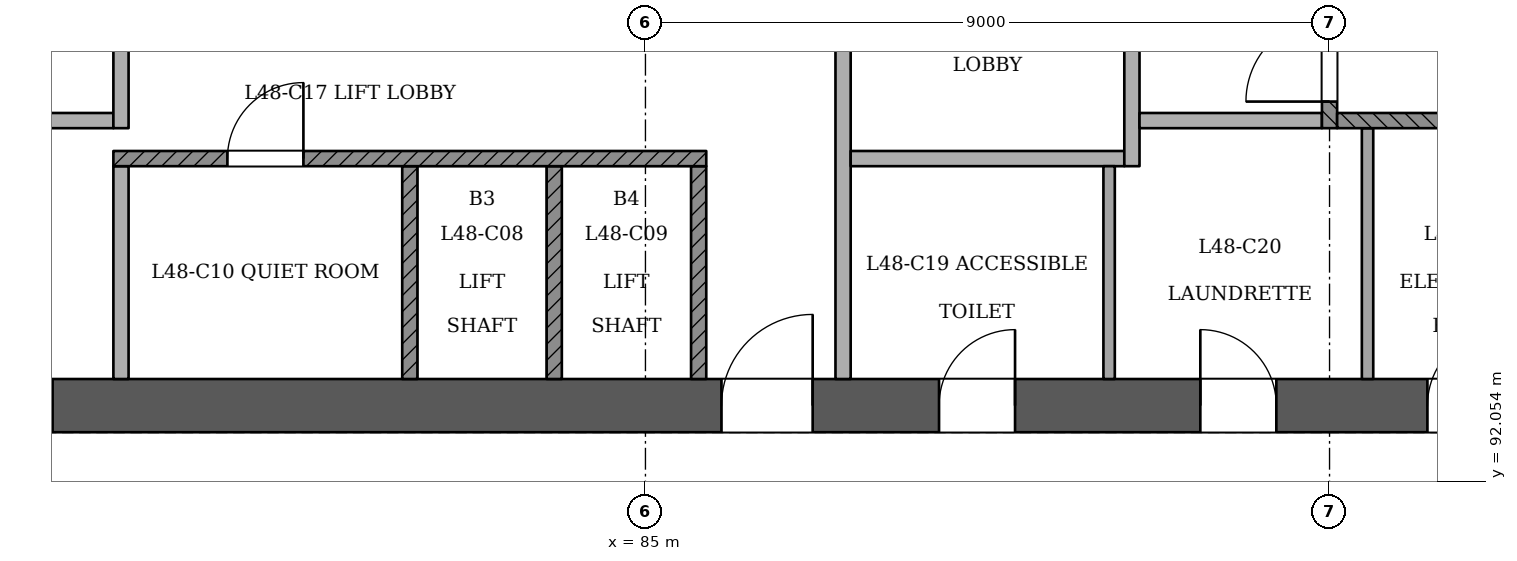
"""IFC4 building model, lengths in metres.
Left out: names, types, materials, properties, quantities, classifications, styles, units other than length and angle.
Written with IfcOpenShell. Run it as: python <this file> out.ifc"""

import sys

from ifc_helpers import new_model, si_unit, direction, frame, frame_2d, origin, place, context, subcontext, project, spatial, rectangle, extrude, element, fill, save


model = new_model("IFC4")
c1 = context("Model", 3, precision=1e-05, world=origin(), true_north=direction((0.0, 1.0)))
c2 = subcontext(c1, "Body", "Model", "MODEL_VIEW")
j1 = project(units=[si_unit("LENGTHUNIT", "METRE"), si_unit("PLANEANGLEUNIT", "RADIAN")], contexts=[c1])
p1 = place(None, origin())
s1 = spatial("IfcSite", under=j1, at=p1, CompositionType="ELEMENT")
p2 = place(p1, origin())
s2 = spatial("IfcBuilding", under=s1, at=p2, CompositionType="ELEMENT")
p3 = place(p2, frame((0.0, 0.0, 185.4)))
s3 = spatial("IfcBuildingStorey", under=s2, at=p3, CompositionType="ELEMENT", Elevation=185.4)
p4 = place(p3, frame((72.65, 93.05, 0.0), z_axis=(0.0, 0.0, 1.0), x_axis=(1.0, 0.0, 0.0)))
e1 = element("IfcWall", 1, at=p4, inside=s3, PredefinedType="SHEAR", context=c2, shape_type="SweptSolid", body=[
    extrude(rectangle(XDim=25.05, YDim=0.7, at=frame_2d((12.525, 0.0))), origin(), (0.0, 0.0, 1.0), 3.6),
])
p5 = place(p4, frame((1.15, 0.0, 0.0)))
e2 = element("IfcOpeningElement", 2, at=p5, cuts=e1, PredefinedType="OPENING", context=c2, shape_type="SweptSolid", body=[
    extrude(rectangle(XDim=1.2, YDim=2.1, at=frame_2d((0.6, 1.05))), frame((0.0, 0.36, 0.0), z_axis=(0.0, -1.0, 0.0), x_axis=(1.0, 0.0, 0.0)), (0.0, 0.0, 1.0), 0.721),
])
p6 = place(p4, frame((3.35, 0.0, 0.0)))
e3 = element("IfcOpeningElement", 3, at=p6, cuts=e1, PredefinedType="OPENING", context=c2, shape_type="SweptSolid", body=[
    extrude(rectangle(XDim=1.2, YDim=2.1, at=frame_2d((0.6, 1.05))), frame((0.0, 0.36, 0.0), z_axis=(0.0, -1.0, 0.0), x_axis=(1.0, 0.0, 0.0)), (0.0, 0.0, 1.0), 0.721),
])
p7 = place(p4, frame((13.35, 0.0, 0.0)))
e4 = element("IfcOpeningElement", 4, at=p7, cuts=e1, PredefinedType="OPENING", context=c2, shape_type="SweptSolid", body=[
    extrude(rectangle(XDim=1.2, YDim=2.1, at=frame_2d((0.6, 1.05))), frame((0.0, 0.36, 0.0), z_axis=(0.0, -1.0, 0.0), x_axis=(1.0, 0.0, 0.0)), (0.0, 0.0, 1.0), 0.721),
])
p8 = place(p4, frame((16.212, 0.0, 0.0)))
e5 = element("IfcOpeningElement", 5, at=p8, cuts=e1, PredefinedType="OPENING", context=c2, shape_type="SweptSolid", body=[
    extrude(rectangle(XDim=1.0, YDim=2.1, at=frame_2d((0.5, 1.05))), frame((0.0, 0.36, 0.0), z_axis=(0.0, -1.0, 0.0), x_axis=(1.0, 0.0, 0.0)), (0.0, 0.0, 1.0), 0.721),
])
p9 = place(p4, frame((19.65, 0.0, 0.0)))
e6 = element("IfcOpeningElement", 6, at=p9, cuts=e1, PredefinedType="OPENING", context=c2, shape_type="SweptSolid", body=[
    extrude(rectangle(XDim=1.0, YDim=2.1, at=frame_2d((0.5, 1.05))), frame((0.0, 0.36, 0.0), z_axis=(0.0, -1.0, 0.0), x_axis=(1.0, 0.0, 0.0)), (0.0, 0.0, 1.0), 0.721),
])
p10 = place(p4, frame((22.637, 0.0, 0.0)))
e7 = element("IfcOpeningElement", 7, at=p10, cuts=e1, PredefinedType="OPENING", context=c2, shape_type="SweptSolid", body=[
    extrude(rectangle(XDim=1.0, YDim=2.1, at=frame_2d((0.5, 1.05))), frame((0.0, 0.36, 0.0), z_axis=(0.0, -1.0, 0.0), x_axis=(1.0, 0.0, 0.0)), (0.0, 0.0, 1.0), 0.721),
])
p11 = place(p3, frame((78.1, 93.4, 0.0), z_axis=(0.0, 0.0, 1.0), x_axis=(0.0, 1.0, 0.0)))
e8 = element("IfcWall", 8, at=p11, inside=s3, PredefinedType="PARTITIONING", context=c2, shape_type="SweptSolid", body=[
    extrude(rectangle(XDim=2.8, YDim=0.2, at=frame_2d((1.4, 0.0))), origin(), (0.0, 0.0, 1.0), 3.3),
])
for number, where, z_axis, x_axis in (
    (9, (81.9, 93.4, 0.0), (0.0, 0.0, 1.0), (0.0, 1.0, 0.0)),
    (10, (83.8, 93.4, 0.0), (0.0, 0.0, 1.0), (0.0, 1.0, 0.0)),
    (11, (85.7, 93.4, 0.0), (0.0, 0.0, 1.0), (0.0, 1.0, 0.0)),
):
    element("IfcWall", number, at=place(p3, frame(where, z_axis=z_axis, x_axis=x_axis)), inside=s3, PredefinedType="SOLIDWALL", context=c2, shape_type="SweptSolid", body=[
        extrude(rectangle(XDim=2.8, YDim=0.2, at=frame_2d((1.4, 0.0))), origin(), (0.0, 0.0, 1.0), 3.3),
    ])
p12 = place(p3, frame((87.6, 93.4, 0.0), z_axis=(0.0, 0.0, 1.0), x_axis=(0.0, 1.0, 0.0)))
e12 = element("IfcWall", 12, at=p12, inside=s3, PredefinedType="PARTITIONING", context=c2, shape_type="SweptSolid", body=[
    extrude(rectangle(XDim=7.0, YDim=0.2, at=frame_2d((3.5, 0.0))), origin(), (0.0, 0.0, 1.0), 3.3),
])
p13 = place(p12, frame((4.45, 0.0, 0.0)))
e13 = element("IfcOpeningElement", 13, at=p13, cuts=e12, PredefinedType="OPENING", context=c2, shape_type="SweptSolid", body=[
    extrude(rectangle(XDim=1.1, YDim=2.1, at=frame_2d((0.55, 1.05))), frame((0.0, 0.11, 0.0), z_axis=(0.0, -1.0, 0.0), x_axis=(1.0, 0.0, 0.0)), (0.0, 0.0, 1.0), 0.221),
])
p14 = place(p3, frame((91.1, 93.4, 0.0), z_axis=(0.0, 0.0, 1.0), x_axis=(0.0, 1.0, 0.0)))
e14 = element("IfcWall", 14, at=p14, inside=s3, PredefinedType="PARTITIONING", context=c2, shape_type="SweptSolid", body=[
    extrude(rectangle(XDim=2.8, YDim=0.15, at=frame_2d((1.4, 0.0))), origin(), (0.0, 0.0, 1.0), 3.3),
])
p15 = place(p3, frame((94.5, 93.4, 0.0), z_axis=(0.0, 0.0, 1.0), x_axis=(0.0, 1.0, 0.0)))
e15 = element("IfcWall", 15, at=p15, inside=s3, PredefinedType="PARTITIONING", context=c2, shape_type="SweptSolid", body=[
    extrude(rectangle(XDim=3.3, YDim=0.15, at=frame_2d((1.65, 0.0))), origin(), (0.0, 0.0, 1.0), 3.3),
])
p16 = place(p3, frame((78.0, 96.3, 0.0), z_axis=(0.0, 0.0, 1.0), x_axis=(1.0, 0.0, 0.0)))
e16 = element("IfcWall", 16, at=p16, inside=s3, PredefinedType="SOLIDWALL", context=c2, shape_type="SweptSolid", body=[
    extrude(rectangle(XDim=7.8, YDim=0.2, at=frame_2d((3.9, 0.0))), origin(), (0.0, 0.0, 1.0), 3.3),
])
p17 = place(p16, frame((1.5, 0.0, 0.0)))
e17 = element("IfcOpeningElement", 17, at=p17, cuts=e16, PredefinedType="OPENING", context=c2, shape_type="SweptSolid", body=[
    extrude(rectangle(XDim=1.0, YDim=2.1, at=frame_2d((0.5, 1.05))), frame((0.0, 0.11, 0.0), z_axis=(0.0, -1.0, 0.0), x_axis=(1.0, 0.0, 0.0)), (0.0, 0.0, 1.0), 0.221),
])
p18 = place(p3, frame((87.7, 96.3, 0.0), z_axis=(0.0, 0.0, 1.0), x_axis=(1.0, 0.0, 0.0)))
e18 = element("IfcWall", 18, at=p18, inside=s3, PredefinedType="PARTITIONING", context=c2, shape_type="SweptSolid", body=[
    extrude(rectangle(XDim=3.6, YDim=0.2, at=frame_2d((1.8, 0.0))), origin(), (0.0, 0.0, 1.0), 3.3),
])
p19 = place(p3, frame((91.4, 96.2, 0.0), z_axis=(0.0, 0.0, 1.0), x_axis=(0.0, 1.0, 0.0)))
e19 = element("IfcWall", 19, at=p19, inside=s3, PredefinedType="PARTITIONING", context=c2, shape_type="SweptSolid", body=[
    extrude(rectangle(XDim=4.2, YDim=0.2, at=frame_2d((2.1, 0.0))), origin(), (0.0, 0.0, 1.0), 3.3),
])
p20 = place(p19, frame((2.45, 0.0, 0.0)))
e20 = element("IfcOpeningElement", 20, at=p20, cuts=e19, PredefinedType="OPENING", context=c2, shape_type="SweptSolid", body=[
    extrude(rectangle(XDim=1.1, YDim=2.1, at=frame_2d((0.55, 1.05))), frame((0.0, 0.11, 0.0), z_axis=(0.0, -1.0, 0.0), x_axis=(1.0, 0.0, 0.0)), (0.0, 0.0, 1.0), 0.221),
])
p21 = place(p3, frame((76.1, 96.8, 0.0), z_axis=(0.0, 0.0, 1.0), x_axis=(1.0, 0.0, 0.0)))
e21 = element("IfcWall", 21, at=p21, inside=s3, PredefinedType="PARTITIONING", context=c2, shape_type="SweptSolid", body=[
    extrude(rectangle(XDim=1.9, YDim=0.2, at=frame_2d((0.95, 0.0))), origin(), (0.0, 0.0, 1.0), 3.3),
])
p22 = place(p3, frame((78.1, 96.7, 0.0), z_axis=(0.0, 0.0, 1.0), x_axis=(0.0, 1.0, 0.0)))
e22 = element("IfcWall", 22, at=p22, inside=s3, PredefinedType="PARTITIONING", context=c2, shape_type="SweptSolid", body=[
    extrude(rectangle(XDim=3.7, YDim=0.2, at=frame_2d((1.85, 0.0))), origin(), (0.0, 0.0, 1.0), 3.3),
])
p23 = place(p22, frame((1.95, 0.0, 0.0)))
e23 = element("IfcOpeningElement", 23, at=p23, cuts=e22, PredefinedType="OPENING", context=c2, shape_type="SweptSolid", body=[
    extrude(rectangle(XDim=1.1, YDim=2.1, at=frame_2d((0.55, 1.05))), frame((0.0, 0.11, 0.0), z_axis=(0.0, -1.0, 0.0), x_axis=(1.0, 0.0, 0.0)), (0.0, 0.0, 1.0), 0.221),
])
p24 = place(p3, frame((91.5, 96.8, 0.0), z_axis=(0.0, 0.0, 1.0), x_axis=(1.0, 0.0, 0.0)))
e24 = element("IfcWall", 24, at=p24, inside=s3, PredefinedType="PARTITIONING", context=c2, shape_type="SweptSolid", body=[
    extrude(rectangle(XDim=2.4, YDim=0.2, at=frame_2d((1.2, 0.0))), origin(), (0.0, 0.0, 1.0), 3.3),
])
p25 = place(p3, frame((94.0, 96.7, 0.0), z_axis=(0.0, 0.0, 1.0), x_axis=(0.0, 1.0, 0.0)))
e25 = element("IfcWall", 25, at=p25, inside=s3, PredefinedType="SOLIDWALL", context=c2, shape_type="SweptSolid", body=[
    extrude(rectangle(XDim=3.7, YDim=0.2, at=frame_2d((1.85, 0.0))), origin(), (0.0, 0.0, 1.0), 3.3),
])
p26 = place(p25, frame((0.35, 0.0, 0.0)))
e26 = element("IfcOpeningElement", 26, at=p26, cuts=e25, PredefinedType="OPENING", context=c2, shape_type="SweptSolid", body=[
    extrude(rectangle(XDim=1.1, YDim=2.1, at=frame_2d((0.55, 1.05))), frame((0.0, 0.11, 0.0), z_axis=(0.0, -1.0, 0.0), x_axis=(1.0, 0.0, 0.0)), (0.0, 0.0, 1.0), 0.221),
])
p27 = place(p3, frame((94.1, 96.8, 0.0), z_axis=(0.0, 0.0, 1.0), x_axis=(1.0, 0.0, 0.0)))
e27 = element("IfcWall", 27, at=p27, inside=s3, PredefinedType="SOLIDWALL", context=c2, shape_type="SweptSolid", body=[
    extrude(rectangle(XDim=2.9, YDim=0.2, at=frame_2d((1.45, 0.0))), origin(), (0.0, 0.0, 1.0), 3.3),
])
p28 = place(p26, origin())
e28 = element("IfcDoor", 28, at=p28, inside=s3, OperationType="SINGLE_SWING_LEFT", PredefinedType="NOTDEFINED", context=c2, shape_type="SweptSolid", body=[
    extrude(rectangle(XDim=1.1, YDim=2.1, at=frame_2d((0.55, 1.05))), frame((0.0, 0.025, 0.0), z_axis=(0.0, -1.0, 0.0), x_axis=(1.0, 0.0, 0.0)), (0.0, 0.0, 1.0), 0.05),
])
fill(e26, e28)
p29 = place(p6, origin())
e29 = element("IfcDoor", 29, at=p29, inside=s3, OperationType="SINGLE_SWING_LEFT", PredefinedType="NOTDEFINED", context=c2, shape_type="SweptSolid", body=[
    extrude(rectangle(XDim=1.2, YDim=2.1, at=frame_2d((0.6, 1.05))), frame((0.0, 0.025, 0.0), z_axis=(0.0, -1.0, 0.0), x_axis=(1.0, 0.0, 0.0)), (0.0, 0.0, 1.0), 0.05),
])
fill(e3, e29)
p30 = place(p7, origin())
e30 = element("IfcDoor", 30, at=p30, inside=s3, OperationType="SINGLE_SWING_RIGHT", PredefinedType="NOTDEFINED", context=c2, shape_type="SweptSolid", body=[
    extrude(rectangle(XDim=1.2, YDim=2.1, at=frame_2d((0.6, 1.05))), frame((0.0, 0.025, 0.0), z_axis=(0.0, -1.0, 0.0), x_axis=(1.0, 0.0, 0.0)), (0.0, 0.0, 1.0), 0.05),
])
fill(e4, e30)
p31 = place(p8, origin())
e31 = element("IfcDoor", 31, at=p31, inside=s3, OperationType="SINGLE_SWING_RIGHT", PredefinedType="NOTDEFINED", context=c2, shape_type="SweptSolid", body=[
    extrude(rectangle(XDim=1.0, YDim=2.1, at=frame_2d((0.5, 1.05))), frame((0.0, 0.025, 0.0), z_axis=(0.0, -1.0, 0.0), x_axis=(1.0, 0.0, 0.0)), (0.0, 0.0, 1.0), 0.05),
])
fill(e5, e31)
p32 = place(p9, origin())
e32 = element("IfcDoor", 32, at=p32, inside=s3, OperationType="SINGLE_SWING_LEFT", PredefinedType="NOTDEFINED", context=c2, shape_type="SweptSolid", body=[
    extrude(rectangle(XDim=1.0, YDim=2.1, at=frame_2d((0.5, 1.05))), frame((0.0, 0.025, 0.0), z_axis=(0.0, -1.0, 0.0), x_axis=(1.0, 0.0, 0.0)), (0.0, 0.0, 1.0), 0.05),
])
fill(e6, e32)
p33 = place(p10, origin())
e33 = element("IfcDoor", 33, at=p33, inside=s3, OperationType="SINGLE_SWING_RIGHT", PredefinedType="NOTDEFINED", context=c2, shape_type="SweptSolid", body=[
    extrude(rectangle(XDim=1.0, YDim=2.1, at=frame_2d((0.5, 1.05))), frame((0.0, 0.025, 0.0), z_axis=(0.0, -1.0, 0.0), x_axis=(1.0, 0.0, 0.0)), (0.0, 0.0, 1.0), 0.05),
])
fill(e7, e33)
p34 = place(p17, origin())
e34 = element("IfcDoor", 34, at=p34, inside=s3, OperationType="SINGLE_SWING_RIGHT", PredefinedType="NOTDEFINED", context=c2, shape_type="SweptSolid", body=[
    extrude(rectangle(XDim=1.0, YDim=2.1, at=frame_2d((0.5, 1.05))), frame((0.0, 0.025, 0.0), z_axis=(0.0, -1.0, 0.0), x_axis=(1.0, 0.0, 0.0)), (0.0, 0.0, 1.0), 0.05),
])
fill(e17, e34)
save(model, sys.argv[1])
